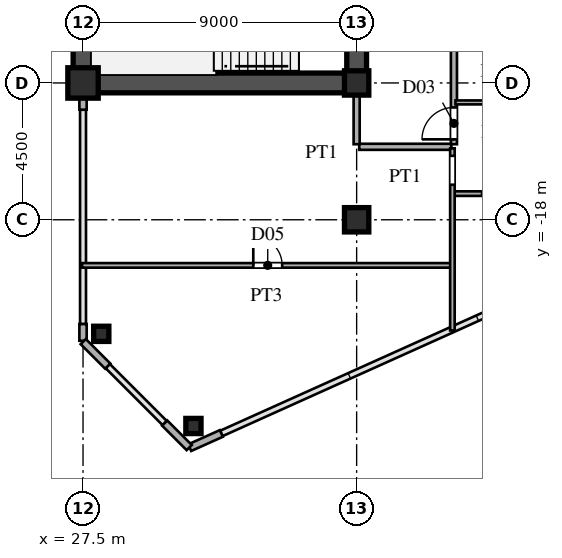
"""IFC4 building model, lengths in metres.
Left out: names, types, materials, properties, quantities, classifications, styles, units other than length and angle.
Written with IfcOpenShell. Run it as: python <this file> out.ifc"""

import sys

from ifc_helpers import new_model, si_unit, direction, frame, frame_2d, origin, origin_2d, place, context, subcontext, project, spatial, rectangle, hollow_rectangle, i_section, extrude, source, transform, mapped, element, fill, save


model = new_model("IFC4")
c1 = context("Model", 3, precision=1e-05, world=origin(), true_north=direction((0.0, 1.0)))
c2 = subcontext(c1, "Body", "Model", "MODEL_VIEW")
j1 = project(units=[si_unit("LENGTHUNIT", "METRE"), si_unit("PLANEANGLEUNIT", "RADIAN")], contexts=[c1])
p1 = place(None, origin())
s1 = spatial("IfcSite", under=j1, at=p1, CompositionType="ELEMENT")
p2 = place(p1, origin())
s2 = spatial("IfcBuilding", under=s1, at=p2, CompositionType="ELEMENT")
p3 = place(p2, frame((0.0, 0.0, 65.7)))
s3 = spatial("IfcBuildingStorey", under=s2, at=p3, CompositionType="ELEMENT", Elevation=65.7)
m1 = source(origin(), c2, "Body", "SweptSolid", [
    extrude(hollow_rectangle(XDim=1.0, YDim=1.0, WallThickness=0.042, at=origin_2d()), origin(), (0.0, 0.0, 1.0), 3.6),
])
p4 = place(p3, frame((27.5, -13.5, 0.0), z_axis=(0.0, 0.0, 1.0), x_axis=(1.0, 0.0, 0.0)))
e1 = element("IfcColumn", 1, at=p4, inside=s3, PredefinedType="COLUMN", context=c2, shape_type="MappedRepresentation", body=[
    mapped(m1, transform((0.0, 0.0, 0.0), scale=1.0)),
])
m2 = source(origin(), c2, "Body", "SweptSolid", [
    extrude(i_section(OverallWidth=0.8, OverallDepth=0.8, WebThickness=0.032, FlangeThickness=0.05, at=origin_2d()), origin(), (0.0, 0.0, 1.0), 3.6),
])
for number, where, z_axis, x_axis in (
    (2, (36.5, -18.0, 0.0), (0.0, 0.0, 1.0), (1.0, 0.0, 0.0)),
    (3, (36.5, -13.5, 0.0), (0.0, 0.0, 1.0), (1.0, 0.0, 0.0)),
):
    element("IfcColumn", number, at=place(p3, frame(where, z_axis=z_axis, x_axis=x_axis)), inside=s3, PredefinedType="COLUMN", context=c2, shape_type="MappedRepresentation", body=[
        mapped(m2, transform((0.0, 0.0, 0.0), scale=1.0)),
    ])
m3 = source(origin(), c2, "Body", "SweptSolid", [
    extrude(hollow_rectangle(XDim=0.5, YDim=0.5, WallThickness=0.02, at=origin_2d()), origin(), (0.0, 0.0, 1.0), 3.6),
])
for number, where, z_axis, x_axis in (
    (4, (31.131, -24.783, 0.0), (0.0, 0.0, 1.0), (1.0, 0.0, 0.0)),
    (5, (28.1, -21.751, 0.0), (0.0, 0.0, 1.0), (1.0, 0.0, 0.0)),
):
    element("IfcColumn", number, at=place(p3, frame(where, z_axis=z_axis, x_axis=x_axis)), inside=s3, PredefinedType="COLUMN", context=c2, shape_type="MappedRepresentation", body=[
        mapped(m3, transform((0.0, 0.0, 0.0), scale=1.0)),
    ])
p5 = place(p3, frame((31.009, -25.496, 0.0), z_axis=(0.0, 0.0, 1.0), x_axis=(0.911929519623, 0.410346866979, 0.0)))
e6 = element("IfcWall", 6, at=p5, inside=s3, PredefinedType="SOLIDWALL", context=c2, shape_type="SweptSolid", body=[
    extrude(rectangle(XDim=1.14, YDim=0.24, at=frame_2d((0.57, 0.0))), origin(), (0.0, 0.0, 1.0), 3.38),
])
p6 = place(p3, frame((27.5, -21.98, 0.0), z_axis=(0.0, 0.0, 1.0), x_axis=(0.0, 1.0, 0.0)))
e7 = element("IfcWall", 7, at=p6, inside=s3, PredefinedType="SOLIDWALL", context=c2, shape_type="SweptSolid", body=[
    extrude(rectangle(XDim=0.55, YDim=0.24, at=frame_2d((0.275, 0.0))), origin(), (0.0, 0.0, 1.0), 3.38),
])
p7 = place(p3, frame((27.5, -14.38, 0.0), z_axis=(0.0, 0.0, 1.0), x_axis=(0.0, 1.0, 0.0)))
e8 = element("IfcWall", 8, at=p7, inside=s3, PredefinedType="SOLIDWALL", context=c2, shape_type="SweptSolid", body=[
    extrude(rectangle(XDim=0.55, YDim=0.24, at=frame_2d((0.275, 0.0))), origin(), (0.0, 0.0, 1.0), 2.88),
])
for number, where, z_axis, x_axis in (
    (9, (27.507, -22.007, 0.0), (0.0, 0.0, 1.0), (0.707, -0.707, 0.0)),
    (10, (30.187, -24.687, 0.0), (0.0, 0.0, 1.0), (0.707, -0.707, 0.0)),
):
    element("IfcWall", number, at=place(p3, frame(where, z_axis=z_axis, x_axis=x_axis)), inside=s3, PredefinedType="SOLIDWALL", context=c2, shape_type="SweptSolid", body=[
        extrude(rectangle(XDim=1.14, YDim=0.24, at=frame_2d((0.57, 0.0))), origin(), (0.0, 0.0, 1.0), 3.38),
    ])
p8 = place(p3, frame((27.5, -13.5, 0.0), z_axis=(0.0, 0.0, 1.0), x_axis=(0.0, 1.0, 0.0)))
e11 = element("IfcWall", 11, at=p8, inside=s3, PredefinedType="SHEAR", context=c2, shape_type="SweptSolid", body=[
    extrude(rectangle(XDim=12.2, YDim=0.65, at=frame_2d((6.1, 0.0))), origin(), (0.0, 0.0, 1.0), 3.38),
])
p9 = place(p3, frame((27.5, -13.5, 0.0), z_axis=(0.0, 0.0, 1.0), x_axis=(1.0, 0.0, 0.0)))
e12 = element("IfcWall", 12, at=p9, inside=s3, PredefinedType="SHEAR", context=c2, shape_type="SweptSolid", body=[
    extrude(rectangle(XDim=9.0, YDim=0.65, at=frame_2d((4.5, 0.0))), origin(), (0.0, 0.0, 1.0), 3.38),
])
p10 = place(p3, frame((36.5, -13.65, 0.0), z_axis=(0.0, 0.0, 1.0), x_axis=(0.0, 1.0, 0.0)))
e13 = element("IfcWall", 13, at=p10, inside=s3, PredefinedType="SHEAR", context=c2, shape_type="SweptSolid", body=[
    extrude(rectangle(XDim=7.15, YDim=0.65, at=frame_2d((3.575, 0.0))), origin(), (0.0, 0.0, 1.0), 3.38),
])
p11 = place(p10, frame((4.675, 0.0, 0.0)))
e14 = element("IfcOpeningElement", 14, at=p11, cuts=e13, PredefinedType="OPENING", context=c2, shape_type="SweptSolid", body=[
    extrude(rectangle(XDim=1.15, YDim=2.2, at=frame_2d((0.575, 1.1))), frame((0.0, 0.335, 0.0), z_axis=(0.0, -1.0, 0.0), x_axis=(1.0, 0.0, 0.0)), (0.0, 0.0, 1.0), 0.67),
])
p12 = place(p3, frame((27.465, -19.5, 0.0), z_axis=(0.0, 0.0, 1.0), x_axis=(1.0, 0.0, 0.0)))
e15 = element("IfcWall", 15, at=p12, inside=s3, PredefinedType="PARTITIONING", context=c2, shape_type="SweptSolid", body=[
    extrude(rectangle(XDim=12.135, YDim=0.15, at=frame_2d((6.067, 0.0))), origin(), (0.0, 0.0, 1.0), 3.38),
])
p13 = place(p12, frame((5.635, 0.0, 0.0)))
e16 = element("IfcOpeningElement", 16, at=p13, cuts=e15, PredefinedType="OPENING", context=c2, shape_type="SweptSolid", body=[
    extrude(rectangle(XDim=0.95, YDim=2.15, at=frame_2d((0.475, 1.075))), frame((0.0, 0.085, 0.0), z_axis=(0.0, -1.0, 0.0), x_axis=(1.0, 0.0, 0.0)), (0.0, 0.0, 1.0), 0.17),
])
p14 = place(p3, frame((39.7, -17.14, 0.0), z_axis=(0.0, 0.0, 1.0), x_axis=(1.0, 0.0, 0.0)))
e17 = element("IfcWall", 17, at=p14, inside=s3, PredefinedType="PARTITIONING", context=c2, shape_type="SweptSolid", body=[
    extrude(rectangle(XDim=2.8, YDim=0.15, at=frame_2d((1.4, 0.0))), origin(), (0.0, 0.0, 1.0), 3.38),
])
p15 = place(p14, frame((0.925, 0.0, 0.0)))
e18 = element("IfcOpeningElement", 18, at=p15, cuts=e17, PredefinedType="OPENING", context=c2, shape_type="SweptSolid", body=[
    extrude(rectangle(XDim=0.95, YDim=2.15, at=frame_2d((0.475, 1.075))), frame((0.0, 0.085, 0.0), z_axis=(0.0, -1.0, 0.0), x_axis=(1.0, 0.0, 0.0)), (0.0, 0.0, 1.0), 0.17),
])
p16 = place(p3, frame((36.585, -15.6, 0.0), z_axis=(0.0, 0.0, 1.0), x_axis=(1.0, 0.0, 0.0)))
e19 = element("IfcWall", 19, at=p16, inside=s3, PredefinedType="PARTITIONING", context=c2, shape_type="SweptSolid", body=[
    extrude(rectangle(XDim=3.03, YDim=0.2, at=frame_2d((1.515, 0.0))), origin(), (0.0, 0.0, 1.0), 3.38),
])
p17 = place(p3, frame((39.75, -14.14, 0.0), z_axis=(0.0, 0.0, 1.0), x_axis=(1.0, 0.0, 0.0)))
e20 = element("IfcWall", 20, at=p17, inside=s3, PredefinedType="PARTITIONING", context=c2, shape_type="SweptSolid", body=[
    extrude(rectangle(XDim=2.75, YDim=0.13, at=frame_2d((1.375, 0.0))), origin(), (0.0, 0.0, 1.0), 3.38),
])
p18 = place(p17, frame((0.935, 0.0, 0.0)))
e21 = element("IfcOpeningElement", 21, at=p18, cuts=e20, PredefinedType="OPENING", context=c2, shape_type="SweptSolid", body=[
    extrude(rectangle(XDim=0.88, YDim=2.1, at=frame_2d((0.44, 1.05))), frame((0.0, 0.075, 0.0), z_axis=(0.0, -1.0, 0.0), x_axis=(1.0, 0.0, 0.0)), (0.0, 0.0, 1.0), 0.15),
])
p19 = place(p3, frame((36.5, -15.515, 0.0), z_axis=(0.0, 0.0, 1.0), x_axis=(0.0, 1.0, 0.0)))
e22 = element("IfcWall", 22, at=p19, inside=s3, PredefinedType="PARTITIONING", context=c2, shape_type="SweptSolid", body=[
    extrude(rectangle(XDim=1.685, YDim=0.2, at=frame_2d((0.842, 0.0))), origin(), (0.0, 0.0, 1.0), 2.68),
])
p20 = place(p3, frame((39.65, -21.642, 0.0), z_axis=(0.0, 0.0, 1.0), x_axis=(0.0, 1.0, 0.0)))
e23 = element("IfcWall", 23, at=p20, inside=s3, PredefinedType="PARTITIONING", context=c2, shape_type="SweptSolid", body=[
    extrude(rectangle(XDim=5.992, YDim=0.15, at=frame_2d((2.996, 0.0))), origin(), (0.0, 0.0, 1.0), 3.38),
])
p21 = place(p20, frame((4.794, 0.0, 0.0)))
e24 = element("IfcOpeningElement", 24, at=p21, cuts=e23, PredefinedType="OPENING", context=c2, shape_type="SweptSolid", body=[
    extrude(rectangle(XDim=0.95, YDim=2.15, at=frame_2d((0.475, 1.075))), frame((0.0, 0.085, 0.0), z_axis=(0.0, -1.0, 0.0), x_axis=(1.0, 0.0, 0.0)), (0.0, 0.0, 1.0), 0.17),
])
p22 = place(p3, frame((39.7, -15.515, 0.0), z_axis=(0.0, 0.0, 1.0), x_axis=(0.0, 1.0, 0.0)))
e25 = element("IfcWall", 25, at=p22, inside=s3, PredefinedType="PARTITIONING", context=c2, shape_type="SweptSolid", body=[
    extrude(rectangle(XDim=31.03, YDim=0.2, at=frame_2d((15.515, 0.0))), origin(), (0.0, 0.0, 1.0), 3.38),
])
p23 = place(p22, frame((0.16, 0.0, 0.0)))
e26 = element("IfcOpeningElement", 26, at=p23, cuts=e25, PredefinedType="OPENING", context=c2, shape_type="SweptSolid", body=[
    extrude(rectangle(XDim=1.05, YDim=2.25, at=frame_2d((0.525, 1.125))), frame((0.0, 0.11, 0.0), z_axis=(0.0, -1.0, 0.0), x_axis=(1.0, 0.0, 0.0)), (0.0, 0.0, 1.0), 0.22),
])
p24 = place(p22, frame((10.28, 0.0, 0.0)))
e27 = element("IfcOpeningElement", 27, at=p24, cuts=e25, PredefinedType="OPENING", context=c2, shape_type="SweptSolid", body=[
    extrude(rectangle(XDim=1.05, YDim=2.25, at=frame_2d((0.525, 1.125))), frame((0.0, 0.11, 0.0), z_axis=(0.0, -1.0, 0.0), x_axis=(1.0, 0.0, 0.0)), (0.0, 0.0, 1.0), 0.22),
])
p25 = place(p22, frame((24.067, 0.0, 0.0)))
e28 = element("IfcOpeningElement", 28, at=p25, cuts=e25, PredefinedType="OPENING", context=c2, shape_type="SweptSolid", body=[
    extrude(rectangle(XDim=1.05, YDim=2.25, at=frame_2d((0.525, 1.125))), frame((0.0, 0.11, 0.0), z_axis=(0.0, -1.0, 0.0), x_axis=(1.0, 0.0, 0.0)), (0.0, 0.0, 1.0), 0.22),
])
m4 = source(origin(), c2, "Body", "SweptSolid", [
    extrude(rectangle(XDim=0.95, YDim=2.15, at=frame_2d((0.475, 1.075))), frame((0.0, 0.025, 0.0), z_axis=(0.0, -1.0, 0.0), x_axis=(1.0, 0.0, 0.0)), (0.0, 0.0, 1.0), 0.05),
])
p26 = place(p13, origin())
e29 = element("IfcDoor", 29, at=p26, inside=s3, OperationType="SINGLE_SWING_LEFT", PredefinedType="DOOR", context=c2, shape_type="MappedRepresentation", body=[
    mapped(m4, transform((0.0, 0.0, 0.0), scale=1.0)),
])
fill(e16, e29)
m5 = source(origin(), c2, "Body", "SweptSolid", [
    extrude(rectangle(XDim=1.05, YDim=2.25, at=frame_2d((0.525, 1.125))), frame((0.0, 0.025, 0.0), z_axis=(0.0, -1.0, 0.0), x_axis=(1.0, 0.0, 0.0)), (0.0, 0.0, 1.0), 0.05),
])
p27 = place(p23, origin())
e30 = element("IfcDoor", 30, at=p27, inside=s3, OperationType="SINGLE_SWING_LEFT", PredefinedType="DOOR", context=c2, shape_type="MappedRepresentation", body=[
    mapped(m5, transform((0.0, 0.0, 0.0), scale=1.0)),
])
fill(e26, e30)
save(model, sys.argv[1])
